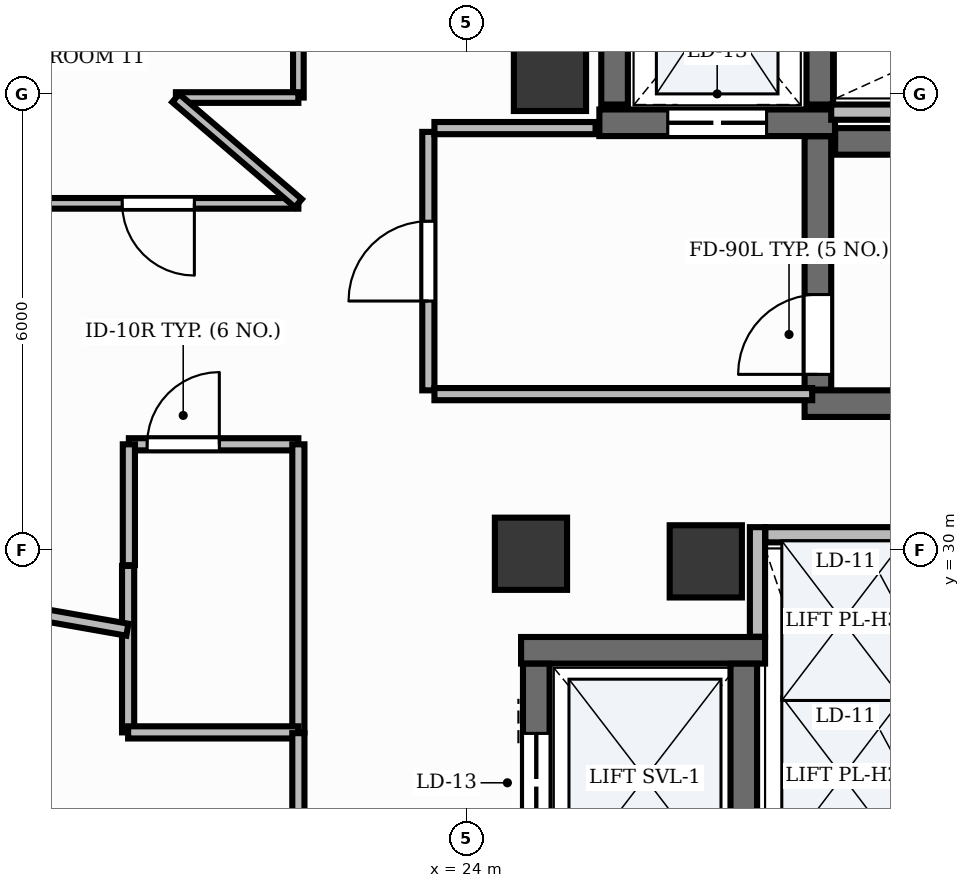
"""IFC4 building model, lengths in metres.
Left out: names, types, materials, properties, quantities, classifications, styles, units other than length and angle.
Written with IfcOpenShell. Run it as: python <this file> out.ifc"""

import sys

from ifc_helpers import new_model, si_unit, direction, frame, frame_2d, origin, origin_2d, place, context, subcontext, project, spatial, rectangle, extrude, element, fill, save


model = new_model("IFC4")
c1 = context("Model", 3, precision=1e-05, world=origin(), true_north=direction((0.0, 1.0)))
c2 = subcontext(c1, "Body", "Model", "MODEL_VIEW")
j1 = project(units=[si_unit("LENGTHUNIT", "METRE"), si_unit("PLANEANGLEUNIT", "RADIAN")], contexts=[c1])
p1 = place(None, origin())
s1 = spatial("IfcSite", under=j1, at=p1, CompositionType="ELEMENT")
p2 = place(p1, origin())
s2 = spatial("IfcBuilding", under=s1, at=p2, CompositionType="ELEMENT")
p3 = place(p2, frame((0.0, 0.0, 297.6)))
s3 = spatial("IfcBuildingStorey", under=s2, at=p3, CompositionType="ELEMENT", Elevation=297.6)
p4 = place(p3, frame((28.852, 35.375, 0.0), z_axis=(0.0, 0.0, 1.0), x_axis=(1.0, 0.0, 0.0)))
e1 = element("IfcWall", 1, at=p4, inside=s3, PredefinedType="SHEAR", context=c2, shape_type="SweptSolid", body=[
    extrude(rectangle(XDim=8.148, YDim=0.35, at=frame_2d((4.074, 0.0))), origin(), (0.0, 0.0, 1.0), 3.9),
])
p5 = place(p3, frame((28.45, 31.925, 0.0), z_axis=(0.0, 0.0, 1.0), x_axis=(1.0, 0.0, 0.0)))
e2 = element("IfcWall", 2, at=p5, inside=s3, PredefinedType="SHEAR", context=c2, shape_type="SweptSolid", body=[
    extrude(rectangle(XDim=8.55, YDim=0.35, at=frame_2d((4.275, 0.0))), origin(), (0.0, 0.0, 1.0), 3.9),
])
p6 = place(p3, frame((28.625, 32.11, 0.0), z_axis=(0.0, 0.0, 1.0), x_axis=(0.0, 1.0, 0.0)))
e3 = element("IfcWall", 3, at=p6, inside=s3, PredefinedType="SHEAR", context=c2, shape_type="SweptSolid", body=[
    extrude(rectangle(XDim=3.333, YDim=0.35, at=frame_2d((1.667, 0.0))), origin(), (0.0, 0.0, 1.0), 3.9),
])
p7 = place(p6, frame((0.2, 0.0, 0.0)))
e4 = element("IfcOpeningElement", 4, at=p7, cuts=e3, PredefinedType="OPENING", context=c2, shape_type="SweptSolid", body=[
    extrude(rectangle(XDim=1.05, YDim=2.15, at=frame_2d((0.525, 1.075))), frame((0.0, 0.19, 0.0), z_axis=(0.0, -1.0, 0.0), x_axis=(1.0, 0.0, 0.0)), (0.0, 0.0, 1.0), 0.38),
])
p8 = place(p3, frame((25.75, 35.62, 0.0), z_axis=(0.0, 0.0, 1.0), x_axis=(1.0, 0.0, 0.0)))
e5 = element("IfcWall", 5, at=p8, inside=s3, PredefinedType="SHEAR", context=c2, shape_type="SweptSolid", body=[
    extrude(rectangle(XDim=3.1, YDim=0.35, at=frame_2d((1.55, 0.0))), origin(), (0.0, 0.0, 1.0), 3.9),
])
p9 = place(p8, frame((0.9, 0.0, 0.0)))
e6 = element("IfcOpeningElement", 6, at=p9, cuts=e5, PredefinedType="OPENING", context=c2, shape_type="SweptSolid", body=[
    extrude(rectangle(XDim=1.3, YDim=2.2, at=frame_2d((0.65, 1.1))), frame((0.0, 0.19, 0.0), z_axis=(0.0, -1.0, 0.0), x_axis=(1.0, 0.0, 0.0)), (0.0, 0.0, 1.0), 0.38),
])
for number, where, z_axis, x_axis in (
    (7, (25.95, 35.86, 0.0), (0.0, 0.0, 1.0), (0.0, 1.0, 0.0)),
    (8, (28.65, 35.86, 0.0), (0.0, 0.0, 1.0), (0.0, 1.0, 0.0)),
):
    element("IfcWall", number, at=place(p3, frame(where, z_axis=z_axis, x_axis=x_axis)), inside=s3, PredefinedType="SHEAR", context=c2, shape_type="SweptSolid", body=[
        extrude(rectangle(XDim=2.7, YDim=0.35, at=frame_2d((1.35, 0.0))), origin(), (0.0, 0.0, 1.0), 3.9),
    ])
p10 = place(p3, frame((24.72, 28.68, 0.0), z_axis=(0.0, 0.0, 1.0), x_axis=(1.0, 0.0, 0.0)))
e9 = element("IfcWall", 9, at=p10, inside=s3, PredefinedType="SHEAR", context=c2, shape_type="SweptSolid", body=[
    extrude(rectangle(XDim=3.21, YDim=0.35, at=frame_2d((1.605, 0.0))), origin(), (0.0, 0.0, 1.0), 3.9),
])
p11 = place(p3, frame((24.92, 25.497, 0.0), z_axis=(0.0, 0.0, 1.0), x_axis=(0.0, 1.0, 0.0)))
e10 = element("IfcWall", 10, at=p11, inside=s3, PredefinedType="SHEAR", context=c2, shape_type="SweptSolid", body=[
    extrude(rectangle(XDim=3.006, YDim=0.35, at=frame_2d((1.503, 0.0))), origin(), (0.0, 0.0, 1.0), 3.9),
])
p12 = place(p11, frame((0.79, 0.0, 0.0)))
e11 = element("IfcOpeningElement", 11, at=p12, cuts=e10, PredefinedType="OPENING", context=c2, shape_type="SweptSolid", body=[
    extrude(rectangle(XDim=1.3, YDim=2.2, at=frame_2d((0.65, 1.1))), frame((0.0, 0.19, 0.0), z_axis=(0.0, -1.0, 0.0), x_axis=(1.0, 0.0, 0.0)), (0.0, 0.0, 1.0), 0.38),
])
p13 = place(p3, frame((27.65, 25.497, 0.0), z_axis=(0.0, 0.0, 1.0), x_axis=(0.0, 1.0, 0.0)))
e12 = element("IfcWall", 12, at=p13, inside=s3, PredefinedType="SHEAR", context=c2, shape_type="SweptSolid", body=[
    extrude(rectangle(XDim=3.006, YDim=0.35, at=frame_2d((1.503, 0.0))), origin(), (0.0, 0.0, 1.0), 3.9),
])
for number, where, z_axis, x_axis in (
    (13, (25.1, 36.25, -0.0), (0.0, 0.0, 1.0), (1.0, 0.0, 0.0)),
    (14, (24.85, 29.95, -0.0), (0.0, 0.0, 1.0), (1.0, 0.0, 0.0)),
    (15, (27.15, 29.85, -0.0), (0.0, 0.0, 1.0), (1.0, 0.0, 0.0)),
):
    element("IfcColumn", number, at=place(p3, frame(where, z_axis=z_axis, x_axis=x_axis)), inside=s3, PredefinedType="PILASTER", context=c2, shape_type="SweptSolid", body=[
        extrude(rectangle(XDim=0.95, YDim=0.95, at=origin_2d()), origin(), (0.0, 0.0, 1.0), 3.901),
    ])
p14 = place(p3, frame((27.83, 28.859, 0.0), z_axis=(0.0, 0.0, 1.0), x_axis=(0.0, 1.0, 0.0)))
e16 = element("IfcWall", 16, at=p14, inside=s3, PredefinedType="PARTITIONING", context=c2, shape_type="SweptSolid", body=[
    extrude(rectangle(XDim=1.441, YDim=0.2, at=frame_2d((0.721, 0.0))), origin(), (0.0, 0.0, 1.0), 2.22),
])
p15 = place(p3, frame((27.934, 30.2, 0.0), z_axis=(0.0, 0.0, 1.0), x_axis=(1.0, 0.0, 0.0)))
e17 = element("IfcWall", 17, at=p15, inside=s3, PredefinedType="PARTITIONING", context=c2, shape_type="SweptSolid", body=[
    extrude(rectangle(XDim=2.096, YDim=0.2, at=frame_2d((1.048, 0.0))), origin(), (0.0, 0.0, 1.0), 2.22),
])
p16 = place(p3, frame((28.8, 35.76, 0.0), z_axis=(0.0, 0.0, 1.0), x_axis=(1.0, 0.0, 0.0)))
e18 = element("IfcWall", 18, at=p16, inside=s3, PredefinedType="PARTITIONING", context=c2, shape_type="SweptSolid", body=[
    extrude(rectangle(XDim=4.57, YDim=0.2, at=frame_2d((2.285, 0.0))), origin(), (0.0, 0.0, 1.0), 2.22),
])
p17 = place(p3, frame((23.5, 32.1, 0.0), z_axis=(0.0, 0.0, 1.0), x_axis=(0.0, 1.0, 0.0)))
e19 = element("IfcWall", 19, at=p17, inside=s3, PredefinedType="PARTITIONING", context=c2, shape_type="SweptSolid", body=[
    extrude(rectangle(XDim=3.4, YDim=0.16, at=frame_2d((1.7, 0.0))), origin(), (0.0, 0.0, 1.0), 2.22),
])
p18 = place(p17, frame((1.175, 0.0, 0.0)))
e20 = element("IfcOpeningElement", 20, at=p18, cuts=e19, PredefinedType="OPENING", context=c2, shape_type="SweptSolid", body=[
    extrude(rectangle(XDim=1.05, YDim=2.15, at=frame_2d((0.525, 1.075))), frame((0.0, 0.095, 0.0), z_axis=(0.0, -1.0, 0.0), x_axis=(1.0, 0.0, 0.0)), (0.0, 0.0, 1.0), 0.19),
])
p19 = place(p3, frame((23.58, 32.05, 0.0), z_axis=(0.0, 0.0, 1.0), x_axis=(1.0, 0.0, 0.0)))
e21 = element("IfcWall", 21, at=p19, inside=s3, PredefinedType="PARTITIONING", context=c2, shape_type="SweptSolid", body=[
    extrude(rectangle(XDim=4.97, YDim=0.16, at=frame_2d((2.485, 0.0))), origin(), (0.0, 0.0, 1.0), 2.22),
])
p20 = place(p3, frame((23.58, 35.55, 0.0), z_axis=(0.0, 0.0, 1.0), x_axis=(1.0, 0.0, 0.0)))
e22 = element("IfcWall", 22, at=p20, inside=s3, PredefinedType="PARTITIONING", context=c2, shape_type="SweptSolid", body=[
    extrude(rectangle(XDim=2.12, YDim=0.16, at=frame_2d((1.06, 0.0))), origin(), (0.0, 0.0, 1.0), 2.22),
])
p21 = place(p3, frame((19.56, 31.39, 0.0), z_axis=(0.0, 0.0, 1.0), x_axis=(1.0, 0.0, 0.0)))
e23 = element("IfcWall", 23, at=p21, inside=s3, PredefinedType="PARTITIONING", context=c2, shape_type="SweptSolid", body=[
    extrude(rectangle(XDim=2.23, YDim=0.16, at=frame_2d((1.115, 0.0))), origin(), (0.0, 0.0, 1.0), 2.22),
])
p22 = place(p21, frame((0.24, 0.0, 0.0)))
e24 = element("IfcOpeningElement", 24, at=p22, cuts=e23, PredefinedType="OPENING", context=c2, shape_type="SweptSolid", body=[
    extrude(rectangle(XDim=0.95, YDim=2.15, at=frame_2d((0.475, 1.075))), frame((0.0, 0.095, 0.0), z_axis=(0.0, -1.0, 0.0), x_axis=(1.0, 0.0, 0.0)), (0.0, 0.0, 1.0), 0.19),
])
p23 = place(p3, frame((21.79, 34.56, 0.0), z_axis=(0.0, 0.0, 1.0), x_axis=(-1.0, 0.0, 0.0)))
e25 = element("IfcWall", 25, at=p23, inside=s3, PredefinedType="PARTITIONING", context=c2, shape_type="SweptSolid", body=[
    extrude(rectangle(XDim=3.99, YDim=0.14, at=frame_2d((1.995, 0.0))), origin(), (0.0, 0.0, 1.0), 2.22),
])
p24 = place(p23, frame((1.368, 0.0, 0.0)))
e26 = element("IfcOpeningElement", 26, at=p24, cuts=e25, PredefinedType="OPENING", context=c2, shape_type="SweptSolid", body=[
    extrude(rectangle(XDim=0.95, YDim=2.15, at=frame_2d((0.475, 1.075))), frame((0.0, 0.085, 0.0), z_axis=(0.0, -1.0, 0.0), x_axis=(1.0, 0.0, 0.0)), (0.0, 0.0, 1.0), 0.17),
])
p25 = place(p3, frame((19.55, 27.6, 0.0), z_axis=(0.0, 0.0, 1.0), x_axis=(0.0, 1.0, 0.0)))
e27 = element("IfcWall", 27, at=p25, inside=s3, PredefinedType="PARTITIONING", context=c2, shape_type="SweptSolid", body=[
    extrude(rectangle(XDim=2.19, YDim=0.16, at=frame_2d((1.095, 0.0))), origin(), (0.0, 0.0, 1.0), 2.22),
])
p26 = place(p3, frame((19.56, 29.8, 0.0), z_axis=(0.0, 0.0, 1.0), x_axis=(0.0, 1.0, 0.0)))
e28 = element("IfcWall", 28, at=p26, inside=s3, PredefinedType="PARTITIONING", context=c2, shape_type="SweptSolid", body=[
    extrude(rectangle(XDim=1.59, YDim=0.16, at=frame_2d((0.795, 0.0))), origin(), (0.0, 0.0, 1.0), 2.22),
])
p27 = place(p3, frame((21.79, 31.39, 0.0), z_axis=(0.0, 0.0, 1.0), x_axis=(0.0, -1.0, 0.0)))
e29 = element("IfcWall", 29, at=p27, inside=s3, PredefinedType="PARTITIONING", context=c2, shape_type="SweptSolid", body=[
    extrude(rectangle(XDim=3.79, YDim=0.16, at=frame_2d((1.895, 0.0))), origin(), (0.0, 0.0, 1.0), 2.22),
])
p28 = place(p3, frame((21.79, 27.6, 0.0), z_axis=(0.0, 0.0, 1.0), x_axis=(-1.0, 0.0, 0.0)))
e30 = element("IfcWall", 30, at=p28, inside=s3, PredefinedType="PARTITIONING", context=c2, shape_type="SweptSolid", body=[
    extrude(rectangle(XDim=2.24, YDim=0.16, at=frame_2d((1.12, 0.0))), origin(), (0.0, 0.0, 1.0), 2.22),
])
p29 = place(p3, frame((14.781, 29.79, 0.0), z_axis=(0.0, 0.0, 1.0), x_axis=(0.984808978389, -0.173641228068, 0.0)))
e31 = element("IfcWall", 31, at=p29, inside=s3, PredefinedType="PARTITIONING", context=c2, shape_type="SweptSolid", body=[
    extrude(rectangle(XDim=4.833, YDim=0.16, at=frame_2d((2.416, 0.0))), origin(), (0.0, 0.0, 1.0), 2.22),
])
p30 = place(p3, frame((21.79, 27.59, 0.0), z_axis=(0.0, 0.0, 1.0), x_axis=(0.0, -1.0, 0.0)))
e32 = element("IfcWall", 32, at=p30, inside=s3, PredefinedType="PARTITIONING", context=c2, shape_type="SweptSolid", body=[
    extrude(rectangle(XDim=3.38, YDim=0.16, at=frame_2d((1.69, 0.0))), origin(), (0.0, 0.0, 1.0), 2.22),
])
p31 = place(p3, frame((21.79, 40.75, 0.0), z_axis=(0.0, 0.0, 1.0), x_axis=(0.0, -1.0, 0.0)))
e33 = element("IfcWall", 33, at=p31, inside=s3, PredefinedType="PARTITIONING", context=c2, shape_type="SweptSolid", body=[
    extrude(rectangle(XDim=4.798, YDim=0.14, at=frame_2d((2.399, 0.0))), origin(), (0.0, 0.0, 1.0), 2.22),
])
p32 = place(p3, frame((21.79, 35.952, 0.0), z_axis=(0.0, 0.0, 1.0), x_axis=(-1.0, 0.0, 0.0)))
e34 = element("IfcWall", 34, at=p32, inside=s3, PredefinedType="PARTITIONING", context=c2, shape_type="SweptSolid", body=[
    extrude(rectangle(XDim=1.611, YDim=0.14, at=frame_2d((0.806, 0.0))), origin(), (0.0, 0.0, 1.0), 2.22),
])
p33 = place(p3, frame((20.176, 35.945, 0.0), z_axis=(0.0, 0.0, 1.0), x_axis=(0.759240386263, -0.650810291765, 0.0)))
e35 = element("IfcWall", 35, at=p33, inside=s3, PredefinedType="PARTITIONING", context=c2, shape_type="SweptSolid", body=[
    extrude(rectangle(XDim=2.125, YDim=0.14, at=frame_2d((1.063, 0.0))), origin(), (0.0, 0.0, 1.0), 2.22),
])
p34 = place(p7, origin())
e36 = element("IfcDoor", 36, at=p34, inside=s3, OperationType="SINGLE_SWING_LEFT", PredefinedType="DOOR", context=c2, shape_type="SweptSolid", body=[
    extrude(rectangle(XDim=1.05, YDim=2.15, at=frame_2d((0.525, 1.075))), frame((0.0, 0.025, 0.0), z_axis=(0.0, -1.0, 0.0), x_axis=(1.0, 0.0, 0.0)), (0.0, 0.0, 1.0), 0.05),
])
fill(e4, e36)
p35 = place(p9, origin())
e37 = element("IfcDoor", 37, at=p35, inside=s3, OperationType="DOUBLE_DOOR_SLIDING", PredefinedType="DOOR", context=c2, shape_type="SweptSolid", body=[
    extrude(rectangle(XDim=1.3, YDim=2.2, at=frame_2d((0.65, 1.1))), frame((0.0, 0.025, 0.0), z_axis=(0.0, -1.0, 0.0), x_axis=(1.0, 0.0, 0.0)), (0.0, 0.0, 1.0), 0.05),
])
fill(e6, e37)
p36 = place(p12, origin())
e38 = element("IfcDoor", 38, at=p36, inside=s3, OperationType="DOUBLE_DOOR_SLIDING", PredefinedType="DOOR", context=c2, shape_type="SweptSolid", body=[
    extrude(rectangle(XDim=1.3, YDim=2.2, at=frame_2d((0.65, 1.1))), frame((0.0, 0.025, 0.0), z_axis=(0.0, -1.0, 0.0), x_axis=(1.0, 0.0, 0.0)), (0.0, 0.0, 1.0), 0.05),
])
fill(e11, e38)
p37 = place(p18, origin())
e39 = element("IfcDoor", 39, at=p37, inside=s3, OperationType="SINGLE_SWING_LEFT", PredefinedType="DOOR", context=c2, shape_type="SweptSolid", body=[
    extrude(rectangle(XDim=1.05, YDim=2.15, at=frame_2d((0.525, 1.075))), frame((0.0, 0.025, 0.0), z_axis=(0.0, -1.0, 0.0), x_axis=(1.0, 0.0, 0.0)), (0.0, 0.0, 1.0), 0.05),
])
fill(e20, e39)
p38 = place(p22, origin())
e40 = element("IfcDoor", 40, at=p38, inside=s3, OperationType="SINGLE_SWING_RIGHT", PredefinedType="DOOR", context=c2, shape_type="SweptSolid", body=[
    extrude(rectangle(XDim=0.95, YDim=2.15, at=frame_2d((0.475, 1.075))), frame((0.0, 0.025, 0.0), z_axis=(0.0, -1.0, 0.0), x_axis=(1.0, 0.0, 0.0)), (0.0, 0.0, 1.0), 0.05),
])
fill(e24, e40)
p39 = place(p24, origin())
e41 = element("IfcDoor", 41, at=p39, inside=s3, OperationType="SINGLE_SWING_LEFT", PredefinedType="DOOR", context=c2, shape_type="SweptSolid", body=[
    extrude(rectangle(XDim=0.95, YDim=2.15, at=frame_2d((0.475, 1.075))), frame((0.0, 0.025, 0.0), z_axis=(0.0, -1.0, 0.0), x_axis=(1.0, 0.0, 0.0)), (0.0, 0.0, 1.0), 0.05),
])
fill(e26, e41)
save(model, sys.argv[1])
